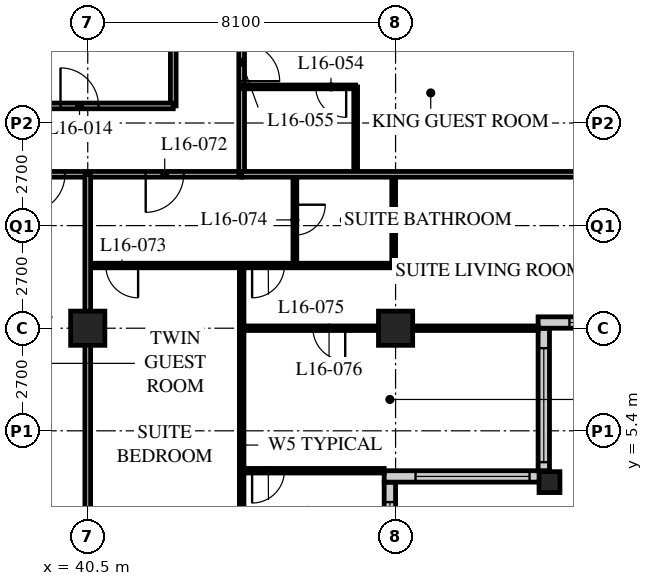
"""IFC4 building model, lengths in metres.
Left out: names, types, materials, properties, quantities, classifications, styles, units other than length and angle.
Written with IfcOpenShell. Run it as: python <this file> out.ifc"""

import sys

from ifc_helpers import new_model, si_unit, direction, frame, frame_2d, origin, origin_2d, place, context, subcontext, project, spatial, rectangle, hollow_rectangle, extrude, element, fill, save


model = new_model("IFC4")
c1 = context("Model", 3, precision=1e-05, world=origin(), true_north=direction((0.0, 1.0)))
c2 = subcontext(c1, "Body", "Model", "MODEL_VIEW")
j1 = project(units=[si_unit("LENGTHUNIT", "METRE"), si_unit("PLANEANGLEUNIT", "RADIAN")], contexts=[c1])
p1 = place(None, origin())
s1 = spatial("IfcSite", under=j1, at=p1, CompositionType="ELEMENT")
p2 = place(p1, origin())
s2 = spatial("IfcBuilding", under=s1, at=p2, CompositionType="ELEMENT")
p3 = place(p2, frame((0.0, 0.0, 67.0)))
s3 = spatial("IfcBuildingStorey", under=s2, at=p3, CompositionType="ELEMENT", Elevation=67.0)
for number, where, z_axis, x_axis in (
    (1, (40.5, 8.1, 0.0), (0.0, 0.0, 1.0), (1.0, 0.0, 0.0)),
    (2, (48.6, 8.1, 0.0), (0.0, 0.0, 1.0), (1.0, 0.0, 0.0)),
):
    element("IfcColumn", number, at=place(p3, frame(where, z_axis=z_axis, x_axis=x_axis)), inside=s3, PredefinedType="COLUMN", context=c2, shape_type="SweptSolid", body=[
        extrude(hollow_rectangle(XDim=0.9, YDim=0.9, WallThickness=0.09, at=origin_2d()), origin(), (0.0, 0.0, 1.0), 3.4),
    ])
p4 = place(p3, frame((52.65, 4.05, 0.0), z_axis=(0.0, 0.0, 1.0), x_axis=(1.0, 0.0, 0.0)))
e3 = element("IfcColumn", 3, at=p4, inside=s3, PredefinedType="COLUMN", context=c2, shape_type="SweptSolid", body=[
    extrude(hollow_rectangle(XDim=0.55, YDim=0.55, WallThickness=0.05, at=origin_2d()), origin(), (0.0, 0.0, 1.0), 3.4),
])
p5 = place(p3, frame((48.45, 0.3, 0.0), z_axis=(0.0, 0.0, 1.0), x_axis=(0.0, 1.0, 0.0)))
e4 = element("IfcWall", 4, at=p5, inside=s3, PredefinedType="SOLIDWALL", context=c2, shape_type="SweptSolid", body=[
    extrude(rectangle(XDim=3.75, YDim=0.3, at=frame_2d((1.875, 0.0))), origin(), (0.0, 0.0, 1.0), 3.19),
])
p6 = place(p5, frame((0.225, 0.0, 0.9)))
e5 = element("IfcOpeningElement", 5, at=p6, cuts=e4, PredefinedType="OPENING", context=c2, shape_type="SweptSolid", body=[
    extrude(rectangle(XDim=3.0, YDim=1.5, at=frame_2d((1.5, 0.75))), frame((0.0, 0.16, 0.0), z_axis=(0.0, -1.0, 0.0), x_axis=(1.0, 0.0, 0.0)), (0.0, 0.0, 1.0), 0.32),
])
p7 = place(p3, frame((48.3, 4.2, 0.0), z_axis=(0.0, 0.0, 1.0), x_axis=(1.0, 0.0, 0.0)))
e6 = element("IfcWall", 6, at=p7, inside=s3, PredefinedType="SOLIDWALL", context=c2, shape_type="SweptSolid", body=[
    extrude(rectangle(XDim=4.35, YDim=0.3, at=frame_2d((2.175, 0.0))), origin(), (0.0, 0.0, 1.0), 3.19),
])
p8 = place(p7, frame((0.825, 0.0, 0.9)))
e7 = element("IfcOpeningElement", 7, at=p8, cuts=e6, PredefinedType="OPENING", context=c2, shape_type="SweptSolid", body=[
    extrude(rectangle(XDim=3.0, YDim=1.5, at=frame_2d((1.5, 0.75))), frame((0.0, 0.16, 0.0), z_axis=(0.0, -1.0, 0.0), x_axis=(1.0, 0.0, 0.0)), (0.0, 0.0, 1.0), 0.32),
])
p9 = place(p3, frame((52.5, 4.35, 0.0), z_axis=(0.0, 0.0, 1.0), x_axis=(0.0, 1.0, 0.0)))
e8 = element("IfcWall", 8, at=p9, inside=s3, PredefinedType="SOLIDWALL", context=c2, shape_type="SweptSolid", body=[
    extrude(rectangle(XDim=3.75, YDim=0.3, at=frame_2d((1.875, 0.0))), origin(), (0.0, 0.0, 1.0), 3.19),
])
p10 = place(p9, frame((0.225, 0.0, 0.9)))
e9 = element("IfcOpeningElement", 9, at=p10, cuts=e8, PredefinedType="OPENING", context=c2, shape_type="SweptSolid", body=[
    extrude(rectangle(XDim=3.0, YDim=1.5, at=frame_2d((1.5, 0.75))), frame((0.0, 0.16, 0.0), z_axis=(0.0, -1.0, 0.0), x_axis=(1.0, 0.0, 0.0)), (0.0, 0.0, 1.0), 0.32),
])
p11 = place(p3, frame((52.35, 8.25, 0.0), z_axis=(0.0, 0.0, 1.0), x_axis=(1.0, 0.0, 0.0)))
e10 = element("IfcWall", 10, at=p11, inside=s3, PredefinedType="SOLIDWALL", context=c2, shape_type="SweptSolid", body=[
    extrude(rectangle(XDim=4.35, YDim=0.3, at=frame_2d((2.175, 0.0))), origin(), (0.0, 0.0, 1.0), 3.19),
])
p12 = place(p11, frame((0.825, 0.0, 0.9)))
e11 = element("IfcOpeningElement", 11, at=p12, cuts=e10, PredefinedType="OPENING", context=c2, shape_type="SweptSolid", body=[
    extrude(rectangle(XDim=3.0, YDim=1.5, at=frame_2d((1.5, 0.75))), frame((0.0, 0.16, 0.0), z_axis=(0.0, -1.0, 0.0), x_axis=(1.0, 0.0, 0.0)), (0.0, 0.0, 1.0), 0.32),
])
p13 = place(p3, frame((8.1, 12.15, 0.0), z_axis=(0.0, 0.0, 1.0), x_axis=(1.0, 0.0, 0.0)))
e12 = element("IfcWall", 12, at=p13, inside=s3, PredefinedType="PARTITIONING", context=c2, shape_type="SweptSolid", body=[
    extrude(rectangle(XDim=36.45, YDim=0.15, at=frame_2d((18.225, 0.0))), origin(), (0.0, 0.0, 1.0), 3.19),
])
p14 = place(p13, frame((4.35, 0.0, 0.0)))
e13 = element("IfcOpeningElement", 13, at=p14, cuts=e12, PredefinedType="OPENING", context=c2, shape_type="SweptSolid", body=[
    extrude(rectangle(XDim=1.0, YDim=2.1, at=frame_2d((0.5, 1.05))), frame((0.0, 0.085, 0.0), z_axis=(0.0, -1.0, 0.0), x_axis=(1.0, 0.0, 0.0)), (0.0, 0.0, 1.0), 0.17),
])
p15 = place(p13, frame((10.55, 0.0, 0.0)))
e14 = element("IfcOpeningElement", 14, at=p15, cuts=e12, PredefinedType="OPENING", context=c2, shape_type="SweptSolid", body=[
    extrude(rectangle(XDim=1.0, YDim=2.1, at=frame_2d((0.5, 1.05))), frame((0.0, 0.085, 0.0), z_axis=(0.0, -1.0, 0.0), x_axis=(1.0, 0.0, 0.0)), (0.0, 0.0, 1.0), 0.17),
])
p16 = place(p13, frame((14.6, 0.0, 0.0)))
e15 = element("IfcOpeningElement", 15, at=p16, cuts=e12, PredefinedType="OPENING", context=c2, shape_type="SweptSolid", body=[
    extrude(rectangle(XDim=1.0, YDim=2.1, at=frame_2d((0.5, 1.05))), frame((0.0, 0.085, 0.0), z_axis=(0.0, -1.0, 0.0), x_axis=(1.0, 0.0, 0.0)), (0.0, 0.0, 1.0), 0.17),
])
p17 = place(p13, frame((18.65, 0.0, 0.0)))
e16 = element("IfcOpeningElement", 16, at=p17, cuts=e12, PredefinedType="OPENING", context=c2, shape_type="SweptSolid", body=[
    extrude(rectangle(XDim=1.0, YDim=2.1, at=frame_2d((0.5, 1.05))), frame((0.0, 0.085, 0.0), z_axis=(0.0, -1.0, 0.0), x_axis=(1.0, 0.0, 0.0)), (0.0, 0.0, 1.0), 0.17),
])
p18 = place(p13, frame((22.7, 0.0, 0.0)))
e17 = element("IfcOpeningElement", 17, at=p18, cuts=e12, PredefinedType="OPENING", context=c2, shape_type="SweptSolid", body=[
    extrude(rectangle(XDim=1.0, YDim=2.1, at=frame_2d((0.5, 1.05))), frame((0.0, 0.085, 0.0), z_axis=(0.0, -1.0, 0.0), x_axis=(1.0, 0.0, 0.0)), (0.0, 0.0, 1.0), 0.17),
])
p19 = place(p13, frame((24.6, 0.0, 0.0)))
e18 = element("IfcOpeningElement", 18, at=p19, cuts=e12, PredefinedType="OPENING", context=c2, shape_type="SweptSolid", body=[
    extrude(rectangle(XDim=1.0, YDim=2.1, at=frame_2d((0.5, 1.05))), frame((0.0, 0.085, 0.0), z_axis=(0.0, -1.0, 0.0), x_axis=(1.0, 0.0, 0.0)), (0.0, 0.0, 1.0), 0.17),
])
p20 = place(p13, frame((30.8, 0.0, 0.0)))
e19 = element("IfcOpeningElement", 19, at=p20, cuts=e12, PredefinedType="OPENING", context=c2, shape_type="SweptSolid", body=[
    extrude(rectangle(XDim=1.0, YDim=2.1, at=frame_2d((0.5, 1.05))), frame((0.0, 0.085, 0.0), z_axis=(0.0, -1.0, 0.0), x_axis=(1.0, 0.0, 0.0)), (0.0, 0.0, 1.0), 0.17),
])
p21 = place(p13, frame((1.525, 0.0, 0.0)))
e20 = element("IfcOpeningElement", 20, at=p21, cuts=e12, PredefinedType="OPENING", context=c2, shape_type="SweptSolid", body=[
    extrude(rectangle(XDim=1.0, YDim=2.1, at=frame_2d((0.5, 1.05))), frame((0.0, 0.085, 0.0), z_axis=(0.0, -1.0, 0.0), x_axis=(1.0, 0.0, 0.0)), (0.0, 0.0, 1.0), 0.17),
])
p22 = place(p13, frame((33.925, 0.0, 0.0)))
e21 = element("IfcOpeningElement", 21, at=p22, cuts=e12, PredefinedType="OPENING", context=c2, shape_type="SweptSolid", body=[
    extrude(rectangle(XDim=1.0, YDim=2.1, at=frame_2d((0.5, 1.05))), frame((0.0, 0.085, 0.0), z_axis=(0.0, -1.0, 0.0), x_axis=(1.0, 0.0, 0.0)), (0.0, 0.0, 1.0), 0.17),
])
p23 = place(p3, frame((44.55, 12.15, 0.0), z_axis=(0.0, 0.0, 1.0), x_axis=(0.0, 1.0, 0.0)))
e22 = element("IfcWall", 22, at=p23, inside=s3, PredefinedType="PARTITIONING", context=c2, shape_type="SweptSolid", body=[
    extrude(rectangle(XDim=30.15, YDim=0.15, at=frame_2d((15.075, 0.0))), origin(), (0.0, 0.0, 1.0), 3.19),
])
p24 = place(p23, frame((2.45, 0.0, 0.0)))
e23 = element("IfcOpeningElement", 23, at=p24, cuts=e22, PredefinedType="OPENING", context=c2, shape_type="SweptSolid", body=[
    extrude(rectangle(XDim=1.0, YDim=2.1, at=frame_2d((0.5, 1.05))), frame((0.0, 0.085, 0.0), z_axis=(0.0, -1.0, 0.0), x_axis=(1.0, 0.0, 0.0)), (0.0, 0.0, 1.0), 0.17),
])
p25 = place(p23, frame((4.35, 0.0, 0.0)))
e24 = element("IfcOpeningElement", 24, at=p25, cuts=e22, PredefinedType="OPENING", context=c2, shape_type="SweptSolid", body=[
    extrude(rectangle(XDim=1.0, YDim=2.1, at=frame_2d((0.5, 1.05))), frame((0.0, 0.085, 0.0), z_axis=(0.0, -1.0, 0.0), x_axis=(1.0, 0.0, 0.0)), (0.0, 0.0, 1.0), 0.17),
])
p26 = place(p23, frame((8.4, 0.0, 0.0)))
e25 = element("IfcOpeningElement", 25, at=p26, cuts=e22, PredefinedType="OPENING", context=c2, shape_type="SweptSolid", body=[
    extrude(rectangle(XDim=1.0, YDim=2.1, at=frame_2d((0.5, 1.05))), frame((0.0, 0.085, 0.0), z_axis=(0.0, -1.0, 0.0), x_axis=(1.0, 0.0, 0.0)), (0.0, 0.0, 1.0), 0.17),
])
p27 = place(p23, frame((14.6, 0.0, 0.0)))
e26 = element("IfcOpeningElement", 26, at=p27, cuts=e22, PredefinedType="OPENING", context=c2, shape_type="SweptSolid", body=[
    extrude(rectangle(XDim=1.0, YDim=2.1, at=frame_2d((0.5, 1.05))), frame((0.0, 0.085, 0.0), z_axis=(0.0, -1.0, 0.0), x_axis=(1.0, 0.0, 0.0)), (0.0, 0.0, 1.0), 0.17),
])
p28 = place(p23, frame((21.65, 0.0, 0.0)))
e27 = element("IfcOpeningElement", 27, at=p28, cuts=e22, PredefinedType="OPENING", context=c2, shape_type="SweptSolid", body=[
    extrude(rectangle(XDim=1.0, YDim=2.1, at=frame_2d((0.5, 1.05))), frame((0.0, 0.085, 0.0), z_axis=(0.0, -1.0, 0.0), x_axis=(1.0, 0.0, 0.0)), (0.0, 0.0, 1.0), 0.17),
])
p29 = place(p23, frame((26.7, 0.0, 0.0)))
e28 = element("IfcOpeningElement", 28, at=p29, cuts=e22, PredefinedType="OPENING", context=c2, shape_type="SweptSolid", body=[
    extrude(rectangle(XDim=1.0, YDim=2.1, at=frame_2d((0.5, 1.05))), frame((0.0, 0.085, 0.0), z_axis=(0.0, -1.0, 0.0), x_axis=(1.0, 0.0, 0.0)), (0.0, 0.0, 1.0), 0.17),
])
p30 = place(p3, frame((42.75, 13.95, 0.0), z_axis=(0.0, 0.0, 1.0), x_axis=(0.0, 1.0, 0.0)))
e29 = element("IfcWall", 29, at=p30, inside=s3, PredefinedType="PARTITIONING", context=c2, shape_type="SweptSolid", body=[
    extrude(rectangle(XDim=26.55, YDim=0.15, at=frame_2d((13.275, 0.0))), origin(), (0.0, 0.0, 1.0), 3.19),
])
p31 = place(p30, frame((13.9, 0.0, 0.0)))
e30 = element("IfcOpeningElement", 30, at=p31, cuts=e29, PredefinedType="OPENING", context=c2, shape_type="SweptSolid", body=[
    extrude(rectangle(XDim=1.0, YDim=2.1, at=frame_2d((0.5, 1.05))), frame((0.0, 0.085, 0.0), z_axis=(0.0, -1.0, 0.0), x_axis=(1.0, 0.0, 0.0)), (0.0, 0.0, 1.0), 0.17),
])
p32 = place(p30, frame((22.0, 0.0, 0.0)))
e31 = element("IfcOpeningElement", 31, at=p32, cuts=e29, PredefinedType="OPENING", context=c2, shape_type="SweptSolid", body=[
    extrude(rectangle(XDim=1.0, YDim=2.1, at=frame_2d((0.5, 1.05))), frame((0.0, 0.085, 0.0), z_axis=(0.0, -1.0, 0.0), x_axis=(1.0, 0.0, 0.0)), (0.0, 0.0, 1.0), 0.17),
])
p33 = place(p3, frame((29.56, 13.95, 0.0), z_axis=(0.0, 0.0, 1.0), x_axis=(1.0, 0.0, 0.0)))
e32 = element("IfcWall", 32, at=p33, inside=s3, PredefinedType="PARTITIONING", context=c2, shape_type="SweptSolid", body=[
    extrude(rectangle(XDim=13.19, YDim=0.15, at=frame_2d((6.595, 0.0))), origin(), (0.0, 0.0, 1.0), 3.19),
])
p34 = place(p33, frame((1.157, 0.0, 0.0)))
e33 = element("IfcOpeningElement", 33, at=p34, cuts=e32, PredefinedType="OPENING", context=c2, shape_type="SweptSolid", body=[
    extrude(rectangle(XDim=1.0, YDim=2.1, at=frame_2d((0.5, 1.05))), frame((0.0, 0.085, 0.0), z_axis=(0.0, -1.0, 0.0), x_axis=(1.0, 0.0, 0.0)), (0.0, 0.0, 1.0), 0.17),
])
p35 = place(p33, frame((5.29, 0.0, 0.0)))
e34 = element("IfcOpeningElement", 34, at=p35, cuts=e32, PredefinedType="OPENING", context=c2, shape_type="SweptSolid", body=[
    extrude(rectangle(XDim=1.0, YDim=2.1, at=frame_2d((0.5, 1.05))), frame((0.0, 0.085, 0.0), z_axis=(0.0, -1.0, 0.0), x_axis=(1.0, 0.0, 0.0)), (0.0, 0.0, 1.0), 0.17),
])
p36 = place(p33, frame((10.223, 0.0, 0.0)))
e35 = element("IfcOpeningElement", 35, at=p36, cuts=e32, PredefinedType="OPENING", context=c2, shape_type="SweptSolid", body=[
    extrude(rectangle(XDim=1.0, YDim=2.1, at=frame_2d((0.5, 1.05))), frame((0.0, 0.085, 0.0), z_axis=(0.0, -1.0, 0.0), x_axis=(1.0, 0.0, 0.0)), (0.0, 0.0, 1.0), 0.17),
])
p37 = place(p3, frame((47.55, 12.15, 0.0), z_axis=(0.0, 0.0, 1.0), x_axis=(0.0, 1.0, 0.0)))
e36 = element("IfcWall", 36, at=p37, inside=s3, PredefinedType="PARTITIONING", context=c2, shape_type="SweptSolid", body=[
    extrude(rectangle(XDim=2.3, YDim=0.1, at=frame_2d((1.15, 0.0))), origin(), (0.0, 0.0, 1.0), 3.19),
])
p38 = place(p3, frame((44.55, 14.45, 0.0), z_axis=(0.0, 0.0, 1.0), x_axis=(1.0, 0.0, 0.0)))
e37 = element("IfcWall", 37, at=p38, inside=s3, PredefinedType="PARTITIONING", context=c2, shape_type="SweptSolid", body=[
    extrude(rectangle(XDim=3.0, YDim=0.1, at=frame_2d((1.5, 0.0))), origin(), (0.0, 0.0, 1.0), 3.19),
])
p39 = place(p38, frame((1.95, 0.0, 0.0)))
e38 = element("IfcOpeningElement", 38, at=p39, cuts=e37, PredefinedType="OPENING", context=c2, shape_type="SweptSolid", body=[
    extrude(rectangle(XDim=0.8, YDim=2.1, at=frame_2d((0.4, 1.05))), frame((0.0, 0.06, 0.0), z_axis=(0.0, -1.0, 0.0), x_axis=(1.0, 0.0, 0.0)), (0.0, 0.0, 1.0), 0.12),
])
p40 = place(p3, frame((40.5, 9.75, 0.0), z_axis=(0.0, 0.0, 1.0), x_axis=(1.0, 0.0, 0.0)))
e39 = element("IfcWall", 39, at=p40, inside=s3, PredefinedType="PARTITIONING", context=c2, shape_type="SweptSolid", body=[
    extrude(rectangle(XDim=8.05, YDim=0.12, at=frame_2d((4.025, 0.0))), origin(), (0.0, 0.0, 1.0), 3.19),
])
p41 = place(p40, frame((0.475, 0.0, 0.0)))
e40 = element("IfcOpeningElement", 40, at=p41, cuts=e39, PredefinedType="OPENING", context=c2, shape_type="SweptSolid", body=[
    extrude(rectangle(XDim=0.85, YDim=2.1, at=frame_2d((0.425, 1.05))), frame((0.0, 0.07, 0.0), z_axis=(0.0, -1.0, 0.0), x_axis=(1.0, 0.0, 0.0)), (0.0, 0.0, 1.0), 0.14),
])
p42 = place(p40, frame((4.325, 0.0, 0.0)))
e41 = element("IfcOpeningElement", 41, at=p42, cuts=e39, PredefinedType="OPENING", context=c2, shape_type="SweptSolid", body=[
    extrude(rectangle(XDim=0.85, YDim=2.1, at=frame_2d((0.425, 1.05))), frame((0.0, 0.07, 0.0), z_axis=(0.0, -1.0, 0.0), x_axis=(1.0, 0.0, 0.0)), (0.0, 0.0, 1.0), 0.14),
])
p43 = place(p3, frame((45.95, 12.15, 0.0), z_axis=(0.0, 0.0, 1.0), x_axis=(0.0, -1.0, 0.0)))
e42 = element("IfcWall", 42, at=p43, inside=s3, PredefinedType="PARTITIONING", context=c2, shape_type="SweptSolid", body=[
    extrude(rectangle(XDim=2.4, YDim=0.1, at=frame_2d((1.2, 0.0))), origin(), (0.0, 0.0, 1.0), 3.19),
])
p44 = place(p43, frame((0.8, 0.0, 0.0)))
e43 = element("IfcOpeningElement", 43, at=p44, cuts=e42, PredefinedType="OPENING", context=c2, shape_type="SweptSolid", body=[
    extrude(rectangle(XDim=0.8, YDim=2.1, at=frame_2d((0.4, 1.05))), frame((0.0, 0.06, 0.0), z_axis=(0.0, -1.0, 0.0), x_axis=(1.0, 0.0, 0.0)), (0.0, 0.0, 1.0), 0.12),
])
p45 = place(p3, frame((48.55, 12.15, 0.0), z_axis=(0.0, 0.0, 1.0), x_axis=(0.0, -1.0, 0.0)))
e44 = element("IfcWall", 44, at=p45, inside=s3, PredefinedType="PARTITIONING", context=c2, shape_type="SweptSolid", body=[
    extrude(rectangle(XDim=2.4, YDim=0.1, at=frame_2d((1.2, 0.0))), origin(), (0.0, 0.0, 1.0), 2.578),
])
p46 = place(p3, frame((44.55, 9.75, 0.0), z_axis=(0.0, 0.0, 1.0), x_axis=(0.0, -1.0, 0.0)))
e45 = element("IfcWall", 45, at=p46, inside=s3, PredefinedType="PARTITIONING", context=c2, shape_type="SweptSolid", body=[
    extrude(rectangle(XDim=9.45, YDim=0.12, at=frame_2d((4.725, 0.0))), origin(), (0.0, 0.0, 1.0), 3.19),
])
p47 = place(p3, frame((44.55, 8.1, 0.0), z_axis=(0.0, 0.0, 1.0), x_axis=(1.0, 0.0, 0.0)))
e46 = element("IfcWall", 46, at=p47, inside=s3, PredefinedType="PARTITIONING", context=c2, shape_type="SweptSolid", body=[
    extrude(rectangle(XDim=7.8, YDim=0.12, at=frame_2d((3.9, 0.0))), origin(), (0.0, 0.0, 1.0), 2.578),
])
p48 = place(p47, frame((1.875, 0.0, 0.0)))
e47 = element("IfcOpeningElement", 47, at=p48, cuts=e46, PredefinedType="OPENING", context=c2, shape_type="SweptSolid", body=[
    extrude(rectangle(XDim=0.85, YDim=2.1, at=frame_2d((0.425, 1.05))), frame((0.0, 0.07, 0.0), z_axis=(0.0, -1.0, 0.0), x_axis=(1.0, 0.0, 0.0)), (0.0, 0.0, 1.0), 0.14),
])
p49 = place(p3, frame((44.55, 12.15, 0.0), z_axis=(0.0, 0.0, 1.0), x_axis=(1.0, 0.0, 0.0)))
e48 = element("IfcWall", 48, at=p49, inside=s3, PredefinedType="PARTITIONING", context=c2, shape_type="SweptSolid", body=[
    extrude(rectangle(XDim=11.85, YDim=0.15, at=frame_2d((5.925, 0.0))), origin(), (0.0, 0.0, 1.0), 3.19),
])
p50 = place(p3, frame((40.5, 12.15, 0.0), z_axis=(0.0, 0.0, 1.0), x_axis=(0.0, -1.0, 0.0)))
e49 = element("IfcWall", 49, at=p50, inside=s3, PredefinedType="PARTITIONING", context=c2, shape_type="SweptSolid", body=[
    extrude(rectangle(XDim=11.85, YDim=0.15, at=frame_2d((5.925, 0.0))), origin(), (0.0, 0.0, 1.0), 2.578),
])
p51 = place(p3, frame((44.55, 4.35, 0.0), z_axis=(0.0, 0.0, 1.0), x_axis=(1.0, 0.0, 0.0)))
e50 = element("IfcWall", 50, at=p51, inside=s3, PredefinedType="PARTITIONING", context=c2, shape_type="SweptSolid", body=[
    extrude(rectangle(XDim=3.75, YDim=0.12, at=frame_2d((1.875, 0.0))), origin(), (0.0, 0.0, 1.0), 3.19),
])
p52 = place(p51, frame((0.275, 0.0, 0.0)))
e51 = element("IfcOpeningElement", 51, at=p52, cuts=e50, PredefinedType="OPENING", context=c2, shape_type="SweptSolid", body=[
    extrude(rectangle(XDim=0.85, YDim=2.1, at=frame_2d((0.425, 1.05))), frame((0.0, 0.07, 0.0), z_axis=(0.0, -1.0, 0.0), x_axis=(1.0, 0.0, 0.0)), (0.0, 0.0, 1.0), 0.14),
])
p53 = place(p6, origin())
e52 = element("IfcWindow", 52, at=p53, inside=s3, PartitioningType="SINGLE_PANEL", PredefinedType="WINDOW", context=c2, shape_type="SweptSolid", body=[
    extrude(rectangle(XDim=3.0, YDim=1.5, at=frame_2d((1.5, 0.75))), frame((0.0, 0.03, 0.0), z_axis=(0.0, -1.0, 0.0), x_axis=(1.0, 0.0, 0.0)), (0.0, 0.0, 1.0), 0.06),
])
fill(e5, e52)
p54 = place(p8, origin())
e53 = element("IfcWindow", 53, at=p54, inside=s3, PartitioningType="SINGLE_PANEL", PredefinedType="WINDOW", context=c2, shape_type="SweptSolid", body=[
    extrude(rectangle(XDim=3.0, YDim=1.5, at=frame_2d((1.5, 0.75))), frame((0.0, 0.03, 0.0), z_axis=(0.0, -1.0, 0.0), x_axis=(1.0, 0.0, 0.0)), (0.0, 0.0, 1.0), 0.06),
])
fill(e7, e53)
p55 = place(p10, origin())
e54 = element("IfcWindow", 54, at=p55, inside=s3, PartitioningType="SINGLE_PANEL", PredefinedType="WINDOW", context=c2, shape_type="SweptSolid", body=[
    extrude(rectangle(XDim=3.0, YDim=1.5, at=frame_2d((1.5, 0.75))), frame((0.0, 0.03, 0.0), z_axis=(0.0, -1.0, 0.0), x_axis=(1.0, 0.0, 0.0)), (0.0, 0.0, 1.0), 0.06),
])
fill(e9, e54)
p56 = place(p12, origin())
e55 = element("IfcWindow", 55, at=p56, inside=s3, PartitioningType="SINGLE_PANEL", PredefinedType="WINDOW", context=c2, shape_type="SweptSolid", body=[
    extrude(rectangle(XDim=3.0, YDim=1.5, at=frame_2d((1.5, 0.75))), frame((0.0, 0.03, 0.0), z_axis=(0.0, -1.0, 0.0), x_axis=(1.0, 0.0, 0.0)), (0.0, 0.0, 1.0), 0.06),
])
fill(e11, e55)
p57 = place(p36, origin())
e56 = element("IfcDoor", 56, at=p57, inside=s3, OperationType="SINGLE_SWING_LEFT", PredefinedType="DOOR", context=c2, shape_type="SweptSolid", body=[
    extrude(rectangle(XDim=1.0, YDim=2.1, at=frame_2d((0.5, 1.05))), frame((0.0, 0.025, 0.0), z_axis=(0.0, -1.0, 0.0), x_axis=(1.0, 0.0, 0.0)), (0.0, 0.0, 1.0), 0.05),
])
fill(e35, e56)
p58 = place(p20, origin())
e57 = element("IfcDoor", 57, at=p58, inside=s3, OperationType="SINGLE_SWING_RIGHT", PredefinedType="DOOR", context=c2, shape_type="SweptSolid", body=[
    extrude(rectangle(XDim=1.0, YDim=2.1, at=frame_2d((0.5, 1.05))), frame((0.0, 0.025, 0.0), z_axis=(0.0, -1.0, 0.0), x_axis=(1.0, 0.0, 0.0)), (0.0, 0.0, 1.0), 0.05),
])
fill(e19, e57)
p59 = place(p39, origin())
e58 = element("IfcDoor", 58, at=p59, inside=s3, OperationType="SINGLE_SWING_LEFT", PredefinedType="DOOR", context=c2, shape_type="SweptSolid", body=[
    extrude(rectangle(XDim=0.8, YDim=2.1, at=frame_2d((0.4, 1.05))), frame((0.0, 0.025, 0.0), z_axis=(0.0, -1.0, 0.0), x_axis=(1.0, 0.0, 0.0)), (0.0, 0.0, 1.0), 0.05),
])
fill(e38, e58)
p60 = place(p24, origin())
e59 = element("IfcDoor", 59, at=p60, inside=s3, OperationType="SINGLE_SWING_RIGHT", PredefinedType="DOOR", context=c2, shape_type="SweptSolid", body=[
    extrude(rectangle(XDim=1.0, YDim=2.1, at=frame_2d((0.5, 1.05))), frame((0.0, 0.025, 0.0), z_axis=(0.0, -1.0, 0.0), x_axis=(1.0, 0.0, 0.0)), (0.0, 0.0, 1.0), 0.05),
])
fill(e23, e59)
p61 = place(p22, origin())
e60 = element("IfcDoor", 60, at=p61, inside=s3, OperationType="SINGLE_SWING_RIGHT", PredefinedType="DOOR", context=c2, shape_type="SweptSolid", body=[
    extrude(rectangle(XDim=1.0, YDim=2.1, at=frame_2d((0.5, 1.05))), frame((0.0, 0.025, 0.0), z_axis=(0.0, -1.0, 0.0), x_axis=(1.0, 0.0, 0.0)), (0.0, 0.0, 1.0), 0.05),
])
fill(e21, e60)
p62 = place(p41, origin())
e61 = element("IfcDoor", 61, at=p62, inside=s3, OperationType="SINGLE_SWING_LEFT", PredefinedType="DOOR", context=c2, shape_type="SweptSolid", body=[
    extrude(rectangle(XDim=0.85, YDim=2.1, at=frame_2d((0.425, 1.05))), frame((0.0, 0.025, 0.0), z_axis=(0.0, -1.0, 0.0), x_axis=(1.0, 0.0, 0.0)), (0.0, 0.0, 1.0), 0.05),
])
fill(e40, e61)
p63 = place(p44, origin())
e62 = element("IfcDoor", 62, at=p63, inside=s3, OperationType="SINGLE_SWING_LEFT", PredefinedType="DOOR", context=c2, shape_type="SweptSolid", body=[
    extrude(rectangle(XDim=0.8, YDim=2.1, at=frame_2d((0.4, 1.05))), frame((0.0, 0.025, 0.0), z_axis=(0.0, -1.0, 0.0), x_axis=(1.0, 0.0, 0.0)), (0.0, 0.0, 1.0), 0.05),
])
fill(e43, e62)
p64 = place(p42, origin())
e63 = element("IfcDoor", 63, at=p64, inside=s3, OperationType="SINGLE_SWING_RIGHT", PredefinedType="DOOR", context=c2, shape_type="SweptSolid", body=[
    extrude(rectangle(XDim=0.85, YDim=2.1, at=frame_2d((0.425, 1.05))), frame((0.0, 0.025, 0.0), z_axis=(0.0, -1.0, 0.0), x_axis=(1.0, 0.0, 0.0)), (0.0, 0.0, 1.0), 0.05),
])
fill(e41, e63)
p65 = place(p48, origin())
e64 = element("IfcDoor", 64, at=p65, inside=s3, OperationType="SINGLE_SWING_LEFT", PredefinedType="DOOR", context=c2, shape_type="SweptSolid", body=[
    extrude(rectangle(XDim=0.85, YDim=2.1, at=frame_2d((0.425, 1.05))), frame((0.0, 0.025, 0.0), z_axis=(0.0, -1.0, 0.0), x_axis=(1.0, 0.0, 0.0)), (0.0, 0.0, 1.0), 0.05),
])
fill(e47, e64)
p66 = place(p52, origin())
e65 = element("IfcDoor", 65, at=p66, inside=s3, OperationType="SINGLE_SWING_RIGHT", PredefinedType="DOOR", context=c2, shape_type="SweptSolid", body=[
    extrude(rectangle(XDim=0.85, YDim=2.1, at=frame_2d((0.425, 1.05))), frame((0.0, 0.025, 0.0), z_axis=(0.0, -1.0, 0.0), x_axis=(1.0, 0.0, 0.0)), (0.0, 0.0, 1.0), 0.05),
])
fill(e51, e65)
save(model, sys.argv[1])
